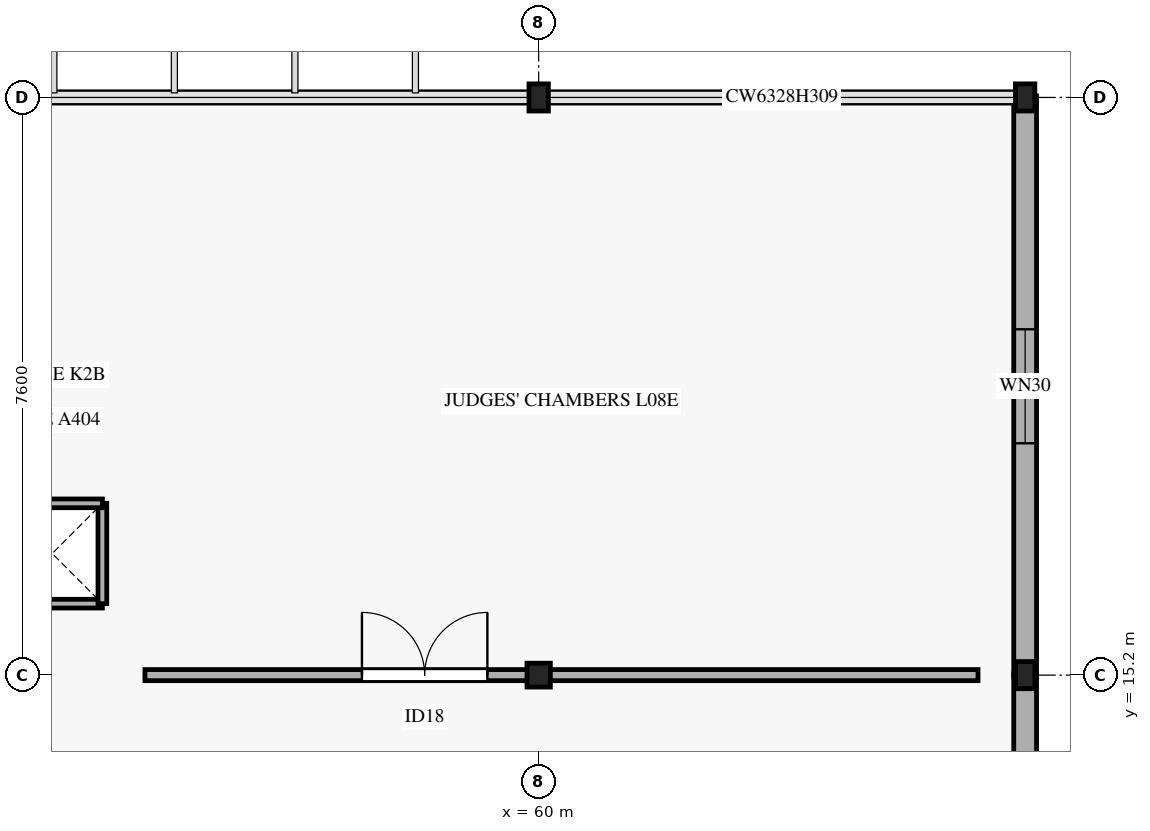
"""IFC4 building model, lengths in metres.
Left out: names, types, materials, properties, quantities, classifications, styles, units other than length and angle.
Written with IfcOpenShell. Run it as: python <this file> out.ifc"""

import sys

from ifc_helpers import new_model, si_unit, direction, frame, frame_2d, origin, origin_2d, place, context, subcontext, project, spatial, rectangle, i_section, extrude, element, fill, save


model = new_model("IFC4")
c1 = context("Model", 3, precision=1e-05, world=origin(), true_north=direction((0.0, 1.0)))
c2 = subcontext(c1, "Body", "Model", "MODEL_VIEW")
j1 = project(units=[si_unit("LENGTHUNIT", "METRE"), si_unit("PLANEANGLEUNIT", "RADIAN")], contexts=[c1])
p1 = place(None, origin())
s1 = spatial("IfcSite", under=j1, at=p1, CompositionType="ELEMENT")
p2 = place(p1, origin())
s2 = spatial("IfcBuilding", under=s1, at=p2, CompositionType="ELEMENT")
p3 = place(p2, frame((0.0, 0.0, 37.8)))
s3 = spatial("IfcBuildingStorey", under=s2, at=p3, CompositionType="ELEMENT", Elevation=37.8)
p4 = place(p3, frame((60.0, 15.2, 0.0), z_axis=(0.0, 0.0, 1.0), x_axis=(1.0, 0.0, 0.0)))
e1 = element("IfcColumn", 1, at=p4, inside=s3, PredefinedType="COLUMN", context=c2, shape_type="SweptSolid", body=[
    extrude(i_section(OverallWidth=0.307, OverallDepth=0.314, WebThickness=0.012, FlangeThickness=0.019, FilletRadius=0.015, at=origin_2d()), origin(), (0.0, 0.0, 1.0), 4.0),
])
for number, where, z_axis, x_axis in (
    (2, (60.0, 22.8, 0.0), (0.0, 0.0, 1.0), (1.0, 0.0, 0.0)),
    (3, (66.4, 15.2, 0.0), (0.0, 0.0, 1.0), (1.0, 0.0, 0.0)),
    (4, (66.4, 22.8, 0.0), (0.0, 0.0, 1.0), (1.0, 0.0, 0.0)),
):
    element("IfcColumn", number, at=place(p3, frame(where, z_axis=z_axis, x_axis=x_axis)), inside=s3, PredefinedType="COLUMN", context=c2, shape_type="SweptSolid", body=[
        extrude(i_section(OverallWidth=0.255, OverallDepth=0.357, WebThickness=0.01, FlangeThickness=0.018, FilletRadius=0.015, at=origin_2d()), origin(), (0.0, 0.0, 1.0), 4.0),
    ])
p5 = place(p3, frame((66.4, 22.82, 0.0), z_axis=(0.0, 0.0, 1.0), x_axis=(0.0, -1.0, 0.0)))
e5 = element("IfcWall", 5, at=p5, inside=s3, PredefinedType="STANDARD", context=c2, shape_type="SweptSolid", body=[
    extrude(rectangle(XDim=7.64, YDim=0.3, at=frame_2d((3.82, 0.0))), origin(), (0.0, 0.0, 1.0), 3.06),
])
p6 = place(p5, frame((3.07, 0.0, 0.75)))
e6 = element("IfcOpeningElement", 6, at=p6, cuts=e5, PredefinedType="OPENING", context=c2, shape_type="SweptSolid", body=[
    extrude(rectangle(XDim=1.5, YDim=1.3, at=frame_2d((0.75, 0.65))), frame((0.0, 0.16, 0.0), z_axis=(0.0, -1.0, 0.0), x_axis=(1.0, 0.0, 0.0)), (0.0, 0.0, 1.0), 0.32),
])
p7 = place(p3, frame((66.4, 15.22, 0.0), z_axis=(0.0, 0.0, 1.0), x_axis=(0.0, -1.0, 0.0)))
e7 = element("IfcWall", 7, at=p7, inside=s3, PredefinedType="STANDARD", context=c2, shape_type="SweptSolid", body=[
    extrude(rectangle(XDim=7.64, YDim=0.3, at=frame_2d((3.82, 0.0))), origin(), (0.0, 0.0, 1.0), 3.06),
])
p8 = place(p7, frame((2.87, 0.0, 0.75)))
e8 = element("IfcOpeningElement", 8, at=p8, cuts=e7, PredefinedType="OPENING", context=c2, shape_type="SweptSolid", body=[
    extrude(rectangle(XDim=1.9, YDim=1.3, at=frame_2d((0.95, 0.65))), frame((0.0, 0.16, 0.0), z_axis=(0.0, -1.0, 0.0), x_axis=(1.0, 0.0, 0.0)), (0.0, 0.0, 1.0), 0.32),
])
for number, where, z_axis, x_axis in (
    (9, (52.94, 16.14, 0.0), (0.0, 0.0, 1.0), (1.0, 0.0, 0.0)),
    (10, (54.26, 16.14, 0.0), (0.0, 0.0, 1.0), (0.0, 1.0, 0.0)),
    (11, (54.26, 17.46, 0.0), (0.0, 0.0, 1.0), (-1.0, 0.0, 0.0)),
):
    element("IfcWall", number, at=place(p3, frame(where, z_axis=z_axis, x_axis=x_axis)), inside=s3, PredefinedType="PARTITIONING", context=c2, shape_type="SweptSolid", body=[
        extrude(rectangle(XDim=1.32, YDim=0.115, at=frame_2d((0.66, 0.0))), origin(), (0.0, 0.0, 1.0), 3.15),
    ])
p9 = place(p3, frame((54.82, 15.2, 0.0), z_axis=(0.0, 0.0, 1.0), x_axis=(1.0, 0.0, 0.0)))
e12 = element("IfcWall", 12, at=p9, inside=s3, PredefinedType="PARTITIONING", context=c2, shape_type="SweptSolid", body=[
    extrude(rectangle(XDim=10.96, YDim=0.146, at=frame_2d((5.48, 0.0))), origin(), (0.0, 0.0, 1.0), 2.85),
])
p10 = place(p9, frame((2.855, 0.0, 0.0)))
e13 = element("IfcOpeningElement", 13, at=p10, cuts=e12, PredefinedType="OPENING", context=c2, shape_type="SweptSolid", body=[
    extrude(rectangle(XDim=1.65, YDim=2.3, at=frame_2d((0.825, 1.15))), frame((0.0, 0.083, 0.0), z_axis=(0.0, -1.0, 0.0), x_axis=(1.0, 0.0, 0.0)), (0.0, 0.0, 1.0), 0.166),
])
p11 = place(p6, origin())
e14 = element("IfcWindow", 14, at=p11, inside=s3, PartitioningType="SINGLE_PANEL", PredefinedType="WINDOW", context=c2, shape_type="SweptSolid", body=[
    extrude(rectangle(XDim=1.5, YDim=1.3, at=frame_2d((0.75, 0.65))), frame((0.0, 0.03, 0.0), z_axis=(0.0, -1.0, 0.0), x_axis=(1.0, 0.0, 0.0)), (0.0, 0.0, 1.0), 0.06),
])
fill(e6, e14)
p12 = place(p10, origin())
e15 = element("IfcDoor", 15, at=p12, inside=s3, OperationType="DOUBLE_DOOR_SINGLE_SWING", PredefinedType="DOOR", context=c2, shape_type="SweptSolid", body=[
    extrude(rectangle(XDim=1.65, YDim=2.3, at=frame_2d((0.825, 1.15))), frame((0.0, 0.025, 0.0), z_axis=(0.0, -1.0, 0.0), x_axis=(1.0, 0.0, 0.0)), (0.0, 0.0, 1.0), 0.05),
])
fill(e13, e15)
save(model, sys.argv[1])
